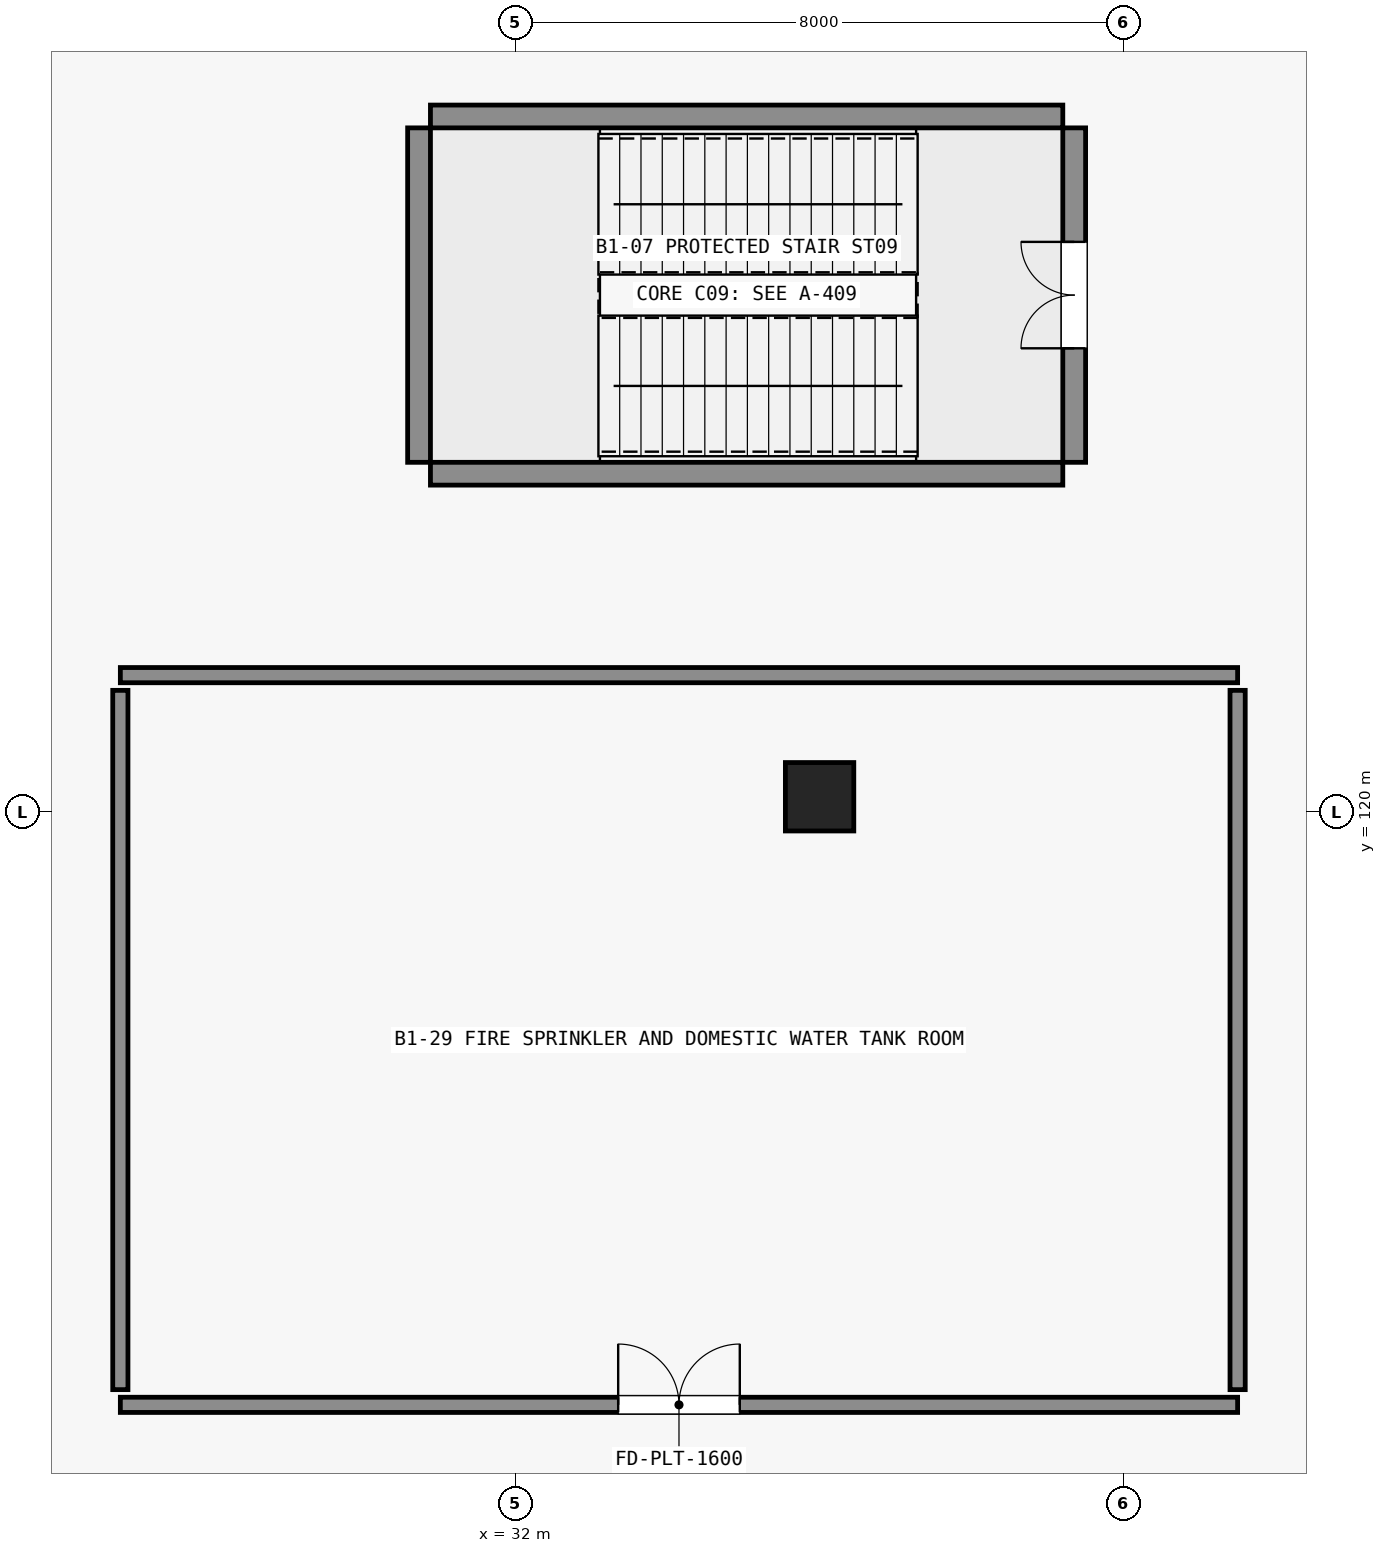
"""IFC4 building model, lengths in metres.
Left out: names, types, materials, properties, quantities, classifications, styles, units other than length and angle.
Written with IfcOpenShell. Run it as: python <this file> out.ifc"""

import sys

from ifc_helpers import new_model, si_unit, direction, frame, frame_2d, origin, origin_2d, place, context, subcontext, project, spatial, rectangle, extrude, element, fill, save


model = new_model("IFC4")
c1 = context("Model", 3, precision=1e-05, world=origin(), true_north=direction((0.0, 1.0)))
c2 = subcontext(c1, "Body", "Model", "MODEL_VIEW")
j1 = project(units=[si_unit("LENGTHUNIT", "METRE"), si_unit("PLANEANGLEUNIT", "RADIAN")], contexts=[c1])
p1 = place(None, origin())
s1 = spatial("IfcSite", under=j1, at=p1, CompositionType="ELEMENT")
p2 = place(p1, origin())
s2 = spatial("IfcBuilding", under=s1, at=p2, CompositionType="ELEMENT")
p3 = place(p2, frame((0.0, 0.0, -5.4)))
s3 = spatial("IfcBuildingStorey", under=s2, at=p3, CompositionType="ELEMENT", Elevation=-5.4)
p4 = place(p3, frame((36.0, 120.2, 0.0), z_axis=(0.0, 0.0, 1.0), x_axis=(1.0, 0.0, 0.0)))
e1 = element("IfcColumn", 1, at=p4, inside=s3, PredefinedType="COLUMN", context=c2, shape_type="SweptSolid", body=[
    extrude(rectangle(XDim=0.9, YDim=0.9, at=origin_2d()), origin(), (0.0, 0.0, 1.0), 5.4),
])
for number, where, z_axis, x_axis in (
    (2, (30.88, 124.45, 0.0), (0.0, 0.0, 1.0), (1.0, 0.0, 0.0)),
    (3, (30.88, 129.15, 0.0), (0.0, 0.0, 1.0), (1.0, 0.0, 0.0)),
):
    element("IfcWall", number, at=place(p3, frame(where, z_axis=z_axis, x_axis=x_axis)), inside=s3, PredefinedType="SHEAR", context=c2, shape_type="SweptSolid", body=[
        extrude(rectangle(XDim=8.32, YDim=0.3, at=frame_2d((4.16, 0.0))), origin(), (0.0, 0.0, 1.0), 5.4),
    ])
p5 = place(p3, frame((30.73, 124.6, 0.0), z_axis=(0.0, 0.0, 1.0), x_axis=(0.0, 1.0, 0.0)))
e4 = element("IfcWall", 4, at=p5, inside=s3, PredefinedType="SHEAR", context=c2, shape_type="SweptSolid", body=[
    extrude(rectangle(XDim=4.4, YDim=0.3, at=frame_2d((2.2, 0.0))), origin(), (0.0, 0.0, 1.0), 5.4),
])
p6 = place(p3, frame((39.35, 124.6, 0.0), z_axis=(0.0, 0.0, 1.0), x_axis=(0.0, 1.0, 0.0)))
e5 = element("IfcWall", 5, at=p6, inside=s3, PredefinedType="SHEAR", context=c2, shape_type="SweptSolid", body=[
    extrude(rectangle(XDim=4.4, YDim=0.3, at=frame_2d((2.2, 0.0))), origin(), (0.0, 0.0, 1.0), 5.4),
])
p7 = place(p6, frame((1.5, 0.0, 0.0)))
e6 = element("IfcOpeningElement", 6, at=p7, cuts=e5, PredefinedType="OPENING", context=c2, shape_type="SweptSolid", body=[
    extrude(rectangle(XDim=1.4, YDim=2.2, at=frame_2d((0.7, 1.1))), frame((0.0, 0.16, 0.0), z_axis=(0.0, -1.0, 0.0), x_axis=(1.0, 0.0, 0.0)), (0.0, 0.0, 1.0), 0.32),
])
p8 = place(p3, frame((26.8, 112.2, 0.0), z_axis=(0.0, 0.0, 1.0), x_axis=(1.0, 0.0, 0.0)))
e7 = element("IfcWall", 7, at=p8, inside=s3, PredefinedType="STANDARD", context=c2, shape_type="SweptSolid", body=[
    extrude(rectangle(XDim=14.7, YDim=0.2, at=frame_2d((7.35, 0.0))), origin(), (0.0, 0.0, 1.0), 4.388),
])
p9 = place(p8, frame((6.55, 0.0, 0.0)))
e8 = element("IfcOpeningElement", 8, at=p9, cuts=e7, PredefinedType="OPENING", context=c2, shape_type="SweptSolid", body=[
    extrude(rectangle(XDim=1.6, YDim=2.3, at=frame_2d((0.8, 1.15))), frame((0.0, 0.11, 0.0), z_axis=(0.0, -1.0, 0.0), x_axis=(1.0, 0.0, 0.0)), (0.0, 0.0, 1.0), 0.22),
])
p10 = place(p3, frame((26.8, 121.8, 0.0), z_axis=(0.0, 0.0, 1.0), x_axis=(1.0, 0.0, 0.0)))
e9 = element("IfcWall", 9, at=p10, inside=s3, PredefinedType="STANDARD", context=c2, shape_type="SweptSolid", body=[
    extrude(rectangle(XDim=14.7, YDim=0.2, at=frame_2d((7.35, 0.0))), origin(), (0.0, 0.0, 1.0), 5.0),
])
for number, where, z_axis, x_axis in (
    (10, (26.8, 112.4, 0.0), (0.0, 0.0, 1.0), (0.0, 1.0, 0.0)),
    (11, (41.5, 112.4, 0.0), (0.0, 0.0, 1.0), (0.0, 1.0, 0.0)),
):
    element("IfcWall", number, at=place(p3, frame(where, z_axis=z_axis, x_axis=x_axis)), inside=s3, PredefinedType="STANDARD", context=c2, shape_type="SweptSolid", body=[
        extrude(rectangle(XDim=9.2, YDim=0.2, at=frame_2d((4.6, 0.0))), origin(), (0.0, 0.0, 1.0), 4.388),
    ])
p11 = place(p7, origin())
e12 = element("IfcDoor", 12, at=p11, inside=s3, OperationType="DOUBLE_DOOR_SINGLE_SWING", PredefinedType="DOOR", context=c2, shape_type="SweptSolid", body=[
    extrude(rectangle(XDim=1.4, YDim=2.2, at=frame_2d((0.7, 1.1))), frame((0.0, 0.025, 0.0), z_axis=(0.0, -1.0, 0.0), x_axis=(1.0, 0.0, 0.0)), (0.0, 0.0, 1.0), 0.05),
])
fill(e6, e12)
p12 = place(p9, origin())
e13 = element("IfcDoor", 13, at=p12, inside=s3, OperationType="DOUBLE_DOOR_SINGLE_SWING", PredefinedType="DOOR", context=c2, shape_type="SweptSolid", body=[
    extrude(rectangle(XDim=1.6, YDim=2.3, at=frame_2d((0.8, 1.15))), frame((0.0, 0.025, 0.0), z_axis=(0.0, -1.0, 0.0), x_axis=(1.0, 0.0, 0.0)), (0.0, 0.0, 1.0), 0.05),
])
fill(e8, e13)
save(model, sys.argv[1])
